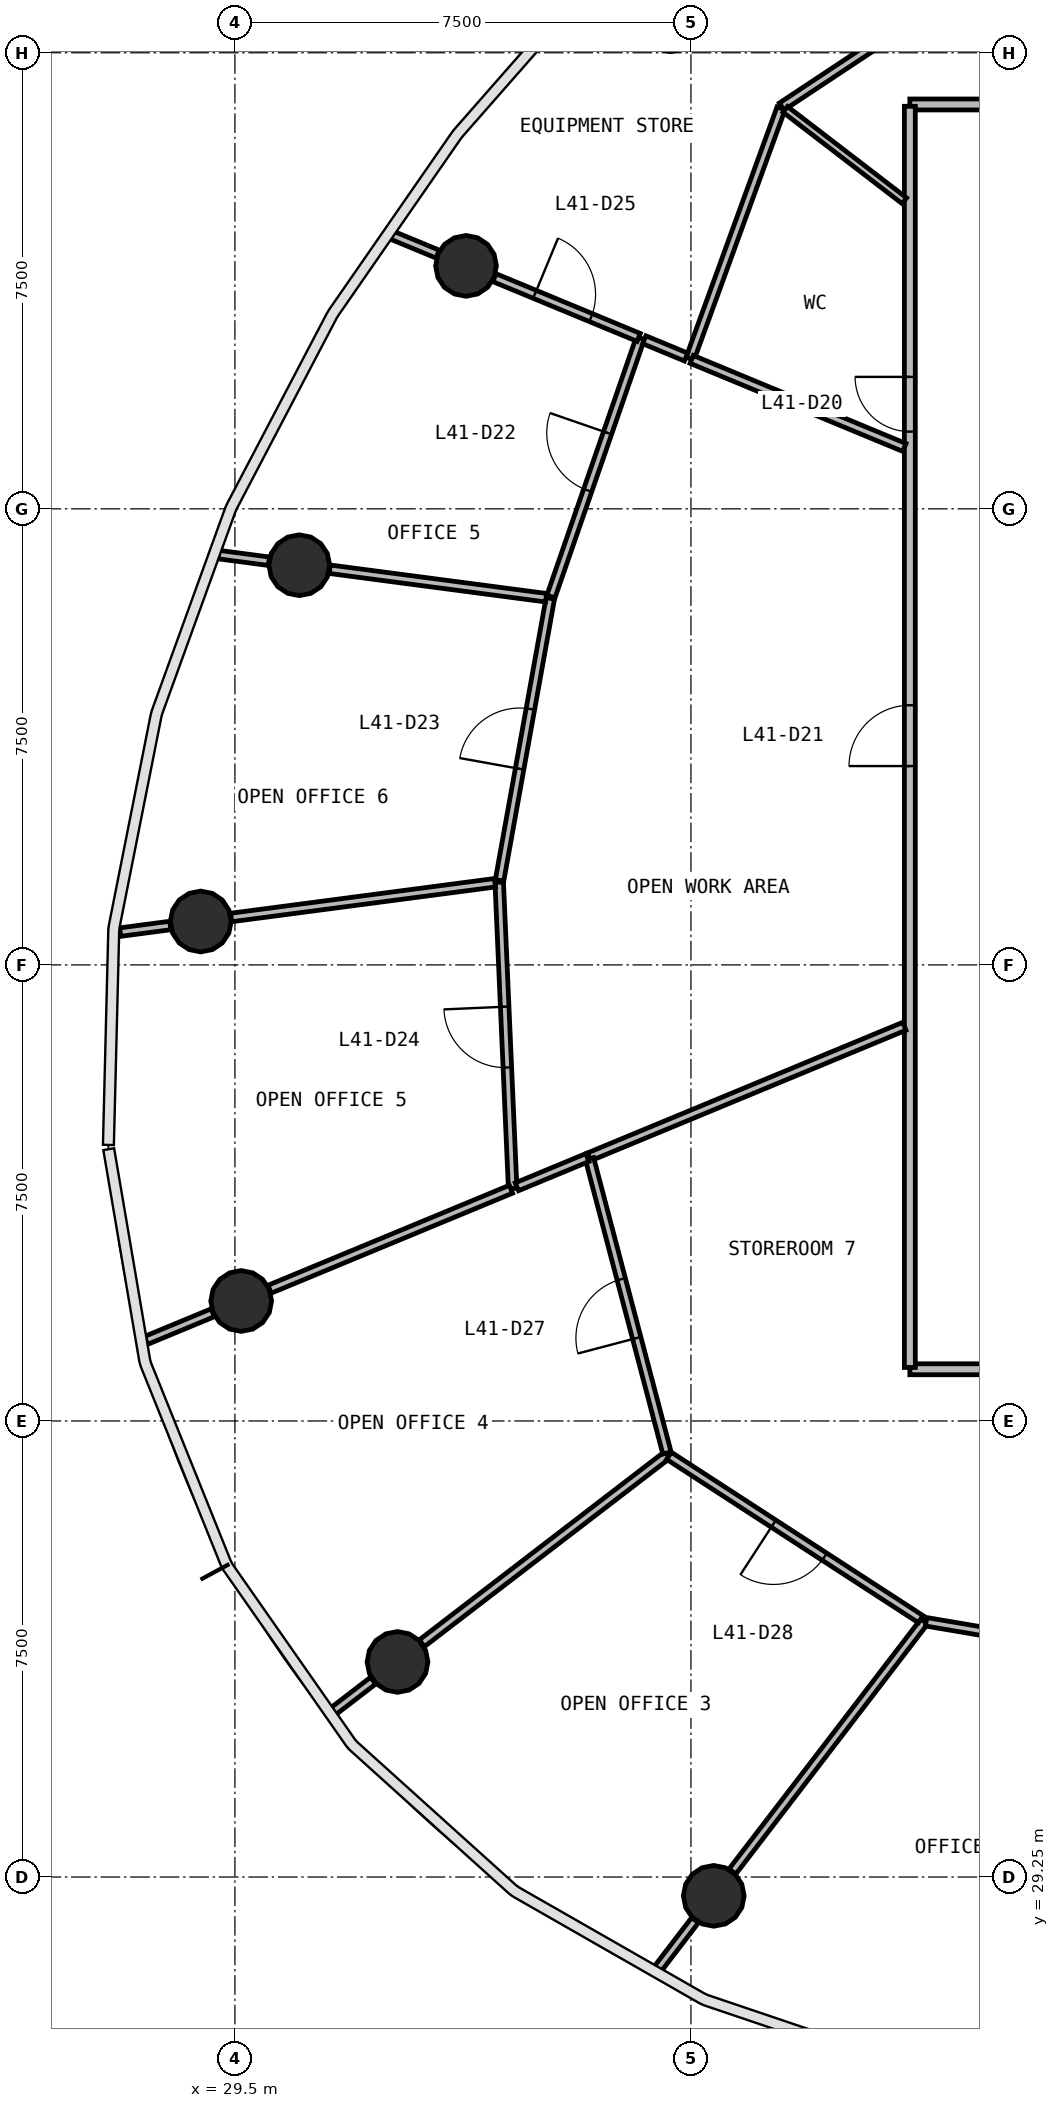
"""IFC4 building model, lengths in metres.
Left out: names, types, materials, properties, quantities, classifications, styles, units other than length and angle.
Written with IfcOpenShell. Run it as: python <this file> out.ifc"""

import sys

from ifc_helpers import new_model, si_unit, direction, frame, frame_2d, origin, origin_2d, place, context, subcontext, project, spatial, rectangle, circle, extrude, source, transform, mapped, element, fill, save


model = new_model("IFC4")
c1 = context("Model", 3, precision=1e-05, world=origin(), true_north=direction((0.0, 1.0)))
c2 = subcontext(c1, "Body", "Model", "MODEL_VIEW")
j1 = project(units=[si_unit("LENGTHUNIT", "METRE"), si_unit("PLANEANGLEUNIT", "RADIAN")], contexts=[c1])
p1 = place(None, origin())
s1 = spatial("IfcSite", under=j1, at=p1, CompositionType="ELEMENT")
p2 = place(p1, origin())
s2 = spatial("IfcBuilding", under=s1, at=p2, CompositionType="ELEMENT")
p3 = place(p2, frame((0.0, 0.0, 172.1)))
s3 = spatial("IfcBuildingStorey", under=s2, at=p3, CompositionType="ELEMENT", Elevation=172.1)
m1 = source(origin(), c2, "Body", "SweptSolid", [
    extrude(circle(Radius=0.5, at=origin_2d()), origin(), (0.0, 0.0, 1.0), 3.9),
])
for number, where, z_axis, x_axis in (
    (1, (33.301, 55.746, 0.0), (0.0, 0.0, 1.0), (1.0, 0.0, 0.0)),
    (2, (30.559, 50.823, 0.0), (0.0, 0.0, 1.0), (1.0, 0.0, 0.0)),
    (3, (28.938, 44.964, 0.0), (0.0, 0.0, 1.0), (1.0, 0.0, 0.0)),
    (4, (29.603, 38.723, 0.0), (0.0, 0.0, 1.0), (1.0, 0.0, 0.0)),
    (5, (32.174, 32.787, 0.0), (0.0, 0.0, 1.0), (1.0, 0.0, 0.0)),
    (6, (37.375, 28.94, 0.0), (0.0, 0.0, 1.0), (1.0, 0.0, 0.0)),
):
    element("IfcColumn", number, at=place(p3, frame(where, z_axis=z_axis, x_axis=x_axis)), inside=s3, PredefinedType="COLUMN", context=c2, shape_type="MappedRepresentation", body=[
        mapped(m1, transform((0.0, 0.0, 0.0), scale=1.0)),
    ])
p4 = place(p3, frame((40.6, 58.4, 0.0), z_axis=(0.0, 0.0, 1.0), x_axis=(1.0, 0.0, 0.0)))
e7 = element("IfcWall", 7, at=p4, inside=s3, PredefinedType="PARTITIONING", context=c2, shape_type="SweptSolid", body=[
    extrude(rectangle(XDim=22.8, YDim=0.18, at=frame_2d((11.4, 0.0))), origin(), (0.0, 0.0, 1.0), 2.88),
])
p5 = place(p4, frame((2.05, 0.0, 0.0)))
e8 = element("IfcOpeningElement", 8, at=p5, cuts=e7, PredefinedType="OPENING", context=c2, shape_type="SweptSolid", body=[
    extrude(rectangle(XDim=0.9, YDim=2.1, at=frame_2d((0.45, 1.05))), frame((0.0, 0.1, 0.0), z_axis=(0.0, -1.0, 0.0), x_axis=(1.0, 0.0, 0.0)), (0.0, 0.0, 1.0), 0.2),
])
p6 = place(p4, frame((16.15, 0.0, 0.0)))
e9 = element("IfcOpeningElement", 9, at=p6, cuts=e7, PredefinedType="OPENING", context=c2, shape_type="SweptSolid", body=[
    extrude(rectangle(XDim=1.0, YDim=2.1, at=frame_2d((0.5, 1.05))), frame((0.0, 0.1, 0.0), z_axis=(0.0, -1.0, 0.0), x_axis=(1.0, 0.0, 0.0)), (0.0, 0.0, 1.0), 0.2),
])
p7 = place(p4, frame((10.95, 0.0, 0.0)))
e10 = element("IfcOpeningElement", 10, at=p7, cuts=e7, PredefinedType="OPENING", context=c2, shape_type="SweptSolid", body=[
    extrude(rectangle(XDim=1.0, YDim=2.1, at=frame_2d((0.5, 1.05))), frame((0.0, 0.1, 0.0), z_axis=(0.0, -1.0, 0.0), x_axis=(1.0, 0.0, 0.0)), (0.0, 0.0, 1.0), 0.2),
])
p8 = place(p4, frame((8.75, 0.0, 0.0)))
e11 = element("IfcOpeningElement", 11, at=p8, cuts=e7, PredefinedType="OPENING", context=c2, shape_type="SweptSolid", body=[
    extrude(rectangle(XDim=1.0, YDim=2.1, at=frame_2d((0.5, 1.05))), frame((0.0, 0.1, 0.0), z_axis=(0.0, -1.0, 0.0), x_axis=(1.0, 0.0, 0.0)), (0.0, 0.0, 1.0), 0.2),
])
p9 = place(p3, frame((63.4, 37.6, 0.0), z_axis=(0.0, 0.0, 1.0), x_axis=(-1.0, 0.0, 0.0)))
e12 = element("IfcWall", 12, at=p9, inside=s3, PredefinedType="PARTITIONING", context=c2, shape_type="SweptSolid", body=[
    extrude(rectangle(XDim=22.8, YDim=0.18, at=frame_2d((11.4, 0.0))), origin(), (0.0, 0.0, 1.0), 2.88),
])
p10 = place(p9, frame((16.15, 0.0, 0.0)))
e13 = element("IfcOpeningElement", 13, at=p10, cuts=e12, PredefinedType="OPENING", context=c2, shape_type="SweptSolid", body=[
    extrude(rectangle(XDim=1.0, YDim=2.1, at=frame_2d((0.5, 1.05))), frame((0.0, 0.1, 0.0), z_axis=(0.0, -1.0, 0.0), x_axis=(1.0, 0.0, 0.0)), (0.0, 0.0, 1.0), 0.2),
])
p11 = place(p9, frame((10.95, 0.0, 0.0)))
e14 = element("IfcOpeningElement", 14, at=p11, cuts=e12, PredefinedType="OPENING", context=c2, shape_type="SweptSolid", body=[
    extrude(rectangle(XDim=1.0, YDim=2.1, at=frame_2d((0.5, 1.05))), frame((0.0, 0.1, 0.0), z_axis=(0.0, -1.0, 0.0), x_axis=(1.0, 0.0, 0.0)), (0.0, 0.0, 1.0), 0.2),
])
p12 = place(p9, frame((8.75, 0.0, 0.0)))
e15 = element("IfcOpeningElement", 15, at=p12, cuts=e12, PredefinedType="OPENING", context=c2, shape_type="SweptSolid", body=[
    extrude(rectangle(XDim=1.0, YDim=2.1, at=frame_2d((0.5, 1.05))), frame((0.0, 0.1, 0.0), z_axis=(0.0, -1.0, 0.0), x_axis=(1.0, 0.0, 0.0)), (0.0, 0.0, 1.0), 0.2),
])
p13 = place(p3, frame((40.6, 37.63, 0.0), z_axis=(0.0, 0.0, 1.0), x_axis=(0.0, 1.0, 0.0)))
e16 = element("IfcWall", 16, at=p13, inside=s3, PredefinedType="PARTITIONING", context=c2, shape_type="SweptSolid", body=[
    extrude(rectangle(XDim=20.74, YDim=0.18, at=frame_2d((10.37, 0.0))), origin(), (0.0, 0.0, 1.0), 2.88),
])
p14 = place(p13, frame((15.39, 0.0, 0.0)))
e17 = element("IfcOpeningElement", 17, at=p14, cuts=e16, PredefinedType="OPENING", context=c2, shape_type="SweptSolid", body=[
    extrude(rectangle(XDim=0.9, YDim=2.1, at=frame_2d((0.45, 1.05))), frame((0.0, 0.1, 0.0), z_axis=(0.0, -1.0, 0.0), x_axis=(1.0, 0.0, 0.0)), (0.0, 0.0, 1.0), 0.2),
])
p15 = place(p13, frame((9.89, 0.0, 0.0)))
e18 = element("IfcOpeningElement", 18, at=p15, cuts=e16, PredefinedType="OPENING", context=c2, shape_type="SweptSolid", body=[
    extrude(rectangle(XDim=1.0, YDim=2.1, at=frame_2d((0.5, 1.05))), frame((0.0, 0.1, 0.0), z_axis=(0.0, -1.0, 0.0), x_axis=(1.0, 0.0, 0.0)), (0.0, 0.0, 1.0), 0.2),
])
p16 = place(p3, frame((40.51, 43.241, 0.0), z_axis=(0.0, 0.0, 1.0), x_axis=(-0.923868925848, -0.382709038112, 0.0)))
e19 = element("IfcWall", 19, at=p16, inside=s3, PredefinedType="PARTITIONING", context=c2, shape_type="SweptSolid", body=[
    extrude(rectangle(XDim=5.613, YDim=0.14, at=frame_2d((2.807, 0.0))), origin(), (0.0, 0.0, 1.0), 2.88),
])
p17 = place(p3, frame((40.837, 33.453, 0.0), z_axis=(0.0, 0.0, 1.0), x_axis=(-0.608781556018, -0.793337895888, 0.0)))
e20 = element("IfcWall", 20, at=p17, inside=s3, PredefinedType="PARTITIONING", context=c2, shape_type="SweptSolid", body=[
    extrude(rectangle(XDim=5.183, YDim=0.14, at=frame_2d((2.591, 0.0))), origin(), (0.0, 0.0, 1.0), 2.88),
])
p18 = place(p3, frame((36.614, 36.194, 0.0), z_axis=(0.0, 0.0, 1.0), x_axis=(-0.793380951851, -0.608725443234, 0.0)))
e21 = element("IfcWall", 21, at=p18, inside=s3, PredefinedType="PARTITIONING", context=c2, shape_type="SweptSolid", body=[
    extrude(rectangle(XDim=5.092, YDim=0.14, at=frame_2d((2.546, 0.0))), origin(), (0.0, 0.0, 1.0), 2.88),
])
p19 = place(p3, frame((36.606, 36.223, 0.0), z_axis=(0.0, 0.0, 1.0), x_axis=(-0.254531708775, 0.967064428685, 0.0)))
e22 = element("IfcWall", 22, at=p19, inside=s3, PredefinedType="PARTITIONING", context=c2, shape_type="SweptSolid", body=[
    extrude(rectangle(XDim=5.006, YDim=0.14, at=frame_2d((2.503, 0.0))), origin(), (0.0, 0.0, 1.0), 2.88),
])
p20 = place(p19, frame((1.956, 0.0, 0.0)))
e23 = element("IfcOpeningElement", 23, at=p20, cuts=e22, PredefinedType="OPENING", context=c2, shape_type="SweptSolid", body=[
    extrude(rectangle(XDim=1.0, YDim=2.1, at=frame_2d((0.5, 1.05))), frame((0.0, 0.08, 0.0), z_axis=(0.0, -1.0, 0.0), x_axis=(1.0, 0.0, 0.0)), (0.0, 0.0, 1.0), 0.16),
])
p21 = place(p3, frame((34.068, 40.572, 0.0), z_axis=(0.0, 0.0, 1.0), x_axis=(-0.043863726501, 0.999037523568, 0.0)))
e24 = element("IfcWall", 24, at=p21, inside=s3, PredefinedType="PARTITIONING", context=c2, shape_type="SweptSolid", body=[
    extrude(rectangle(XDim=5.043, YDim=0.14, at=frame_2d((2.521, 0.0))), origin(), (0.0, 0.0, 1.0), 2.88),
])
p22 = place(p21, frame((1.993, 0.0, 0.0)))
e25 = element("IfcOpeningElement", 25, at=p22, cuts=e24, PredefinedType="OPENING", context=c2, shape_type="SweptSolid", body=[
    extrude(rectangle(XDim=1.0, YDim=2.1, at=frame_2d((0.5, 1.05))), frame((0.0, 0.08, 0.0), z_axis=(0.0, -1.0, 0.0), x_axis=(1.0, 0.0, 0.0)), (0.0, 0.0, 1.0), 0.16),
])
p23 = place(p3, frame((40.779, 33.491, 0.0), z_axis=(0.0, 0.0, 1.0), x_axis=(-0.83885932545, 0.544348263619, 0.0)))
e26 = element("IfcWall", 26, at=p23, inside=s3, PredefinedType="PARTITIONING", context=c2, shape_type="SweptSolid", body=[
    extrude(rectangle(XDim=4.935, YDim=0.14, at=frame_2d((2.467, 0.0))), origin(), (0.0, 0.0, 1.0), 2.88),
])
p24 = place(p23, frame((1.885, 0.0, 0.0)))
e27 = element("IfcOpeningElement", 27, at=p24, cuts=e26, PredefinedType="OPENING", context=c2, shape_type="SweptSolid", body=[
    extrude(rectangle(XDim=1.0, YDim=2.1, at=frame_2d((0.5, 1.05))), frame((0.0, 0.08, 0.0), z_axis=(0.0, -1.0, 0.0), x_axis=(1.0, 0.0, 0.0)), (0.0, 0.0, 1.0), 0.16),
])
p25 = place(p3, frame((45.607, 32.643, 0.0), z_axis=(0.0, 0.0, 1.0), x_axis=(-0.985896840753, 0.167354173514, 0.0)))
e28 = element("IfcWall", 28, at=p25, inside=s3, PredefinedType="PARTITIONING", context=c2, shape_type="SweptSolid", body=[
    extrude(rectangle(XDim=4.808, YDim=0.14, at=frame_2d((2.404, 0.0))), origin(), (0.0, 0.0, 1.0), 2.88),
])
p26 = place(p25, frame((1.958, 0.0, 0.0)))
e29 = element("IfcOpeningElement", 29, at=p26, cuts=e28, PredefinedType="OPENING", context=c2, shape_type="SweptSolid", body=[
    extrude(rectangle(XDim=1.0, YDim=2.1, at=frame_2d((0.5, 1.05))), frame((0.0, 0.08, 0.0), z_axis=(0.0, -1.0, 0.0), x_axis=(1.0, 0.0, 0.0)), (0.0, 0.0, 1.0), 0.16),
])
p27 = place(p3, frame((33.852, 45.64, 0.0), z_axis=(0.0, 0.0, 1.0), x_axis=(0.177167043884, 0.984180795668, 0.0)))
e30 = element("IfcWall", 30, at=p27, inside=s3, PredefinedType="PARTITIONING", context=c2, shape_type="SweptSolid", body=[
    extrude(rectangle(XDim=4.714, YDim=0.14, at=frame_2d((2.357, 0.0))), origin(), (0.0, 0.0, 1.0), 2.88),
])
p28 = place(p27, frame((1.864, 0.0, 0.0)))
e31 = element("IfcOpeningElement", 31, at=p28, cuts=e30, PredefinedType="OPENING", context=c2, shape_type="SweptSolid", body=[
    extrude(rectangle(XDim=1.0, YDim=2.1, at=frame_2d((0.5, 1.05))), frame((0.0, 0.08, 0.0), z_axis=(0.0, -1.0, 0.0), x_axis=(1.0, 0.0, 0.0)), (0.0, 0.0, 1.0), 0.16),
])
p29 = place(p3, frame((34.697, 50.308, 0.0), z_axis=(0.0, 0.0, 1.0), x_axis=(0.327118021709, 0.944983491852, 0.0)))
e32 = element("IfcWall", 32, at=p29, inside=s3, PredefinedType="PARTITIONING", context=c2, shape_type="SweptSolid", body=[
    extrude(rectangle(XDim=4.497, YDim=0.14, at=frame_2d((2.249, 0.0))), origin(), (0.0, 0.0, 1.0), 2.88),
])
p30 = place(p29, frame((1.847, 0.0, 0.0)))
e33 = element("IfcOpeningElement", 33, at=p30, cuts=e32, PredefinedType="OPENING", context=c2, shape_type="SweptSolid", body=[
    extrude(rectangle(XDim=1.0, YDim=2.1, at=frame_2d((0.5, 1.05))), frame((0.0, 0.08, 0.0), z_axis=(0.0, -1.0, 0.0), x_axis=(1.0, 0.0, 0.0)), (0.0, 0.0, 1.0), 0.16),
])
p31 = place(p3, frame((33.777, 45.601, 0.0), z_axis=(0.0, 0.0, 1.0), x_axis=(-0.991451067431, -0.130479043871, 0.0)))
e34 = element("IfcWall", 34, at=p31, inside=s3, PredefinedType="PARTITIONING", context=c2, shape_type="SweptSolid", body=[
    extrude(rectangle(XDim=4.376, YDim=0.14, at=frame_2d((2.188, 0.0))), origin(), (0.0, 0.0, 1.0), 2.88),
])
p32 = place(p3, frame((42.175, 60.804, 0.0), z_axis=(0.0, 0.0, 1.0), x_axis=(-0.833696109899, -0.552223502162, 0.0)))
e35 = element("IfcWall", 35, at=p32, inside=s3, PredefinedType="PARTITIONING", context=c2, shape_type="SweptSolid", body=[
    extrude(rectangle(XDim=4.417, YDim=0.14, at=frame_2d((2.209, 0.0))), origin(), (0.0, 0.0, 1.0), 2.88),
])
p33 = place(p3, frame((38.482, 58.337, 0.0), z_axis=(0.0, 0.0, 1.0), x_axis=(-0.341774383975, -0.939782033484, 0.0)))
e36 = element("IfcWall", 36, at=p33, inside=s3, PredefinedType="PARTITIONING", context=c2, shape_type="SweptSolid", body=[
    extrude(rectangle(XDim=4.381, YDim=0.14, at=frame_2d((2.19, 0.0))), origin(), (0.0, 0.0, 1.0), 2.88),
])
p34 = place(p3, frame((34.04, 40.561, 0.0), z_axis=(0.0, 0.0, 1.0), x_axis=(-0.923886665857, -0.382666210491, 0.0)))
e37 = element("IfcWall", 37, at=p34, inside=s3, PredefinedType="PARTITIONING", context=c2, shape_type="SweptSolid", body=[
    extrude(rectangle(XDim=4.298, YDim=0.14, at=frame_2d((2.149, 0.0))), origin(), (0.0, 0.0, 1.0), 2.88),
])
p35 = place(p3, frame((40.51, 52.759, 0.0), z_axis=(0.0, 0.0, 1.0), x_axis=(-0.923870623115, 0.382704940842, 0.0)))
e38 = element("IfcWall", 38, at=p35, inside=s3, PredefinedType="PARTITIONING", context=c2, shape_type="SweptSolid", body=[
    extrude(rectangle(XDim=3.785, YDim=0.14, at=frame_2d((1.893, 0.0))), origin(), (0.0, 0.0, 1.0), 2.88),
])
p36 = place(p3, frame((34.618, 50.288, 0.0), z_axis=(0.0, 0.0, 1.0), x_axis=(-0.991445727945, 0.130519609791, 0.0)))
e39 = element("IfcWall", 39, at=p36, inside=s3, PredefinedType="PARTITIONING", context=c2, shape_type="SweptSolid", body=[
    extrude(rectangle(XDim=3.59, YDim=0.14, at=frame_2d((1.795, 0.0))), origin(), (0.0, 0.0, 1.0), 2.88),
])
p37 = place(p3, frame((33.767, 55.552, 0.0), z_axis=(0.0, 0.0, 1.0), x_axis=(0.923865084747, -0.38271831049, 0.0)))
e40 = element("IfcWall", 40, at=p37, inside=s3, PredefinedType="PARTITIONING", context=c2, shape_type="SweptSolid", body=[
    extrude(rectangle(XDim=2.569, YDim=0.14, at=frame_2d((1.284, 0.0))), origin(), (0.0, 0.0, 1.0), 2.88),
])
p38 = place(p37, frame((0.719, 0.0, 0.0)))
e41 = element("IfcOpeningElement", 41, at=p38, cuts=e40, PredefinedType="OPENING", context=c2, shape_type="SweptSolid", body=[
    extrude(rectangle(XDim=1.0, YDim=2.1, at=frame_2d((0.5, 1.05))), frame((0.0, 0.08, 0.0), z_axis=(0.0, -1.0, 0.0), x_axis=(1.0, 0.0, 0.0)), (0.0, 0.0, 1.0), 0.16),
])
p39 = place(p3, frame((35.296, 41.081, 0.0), z_axis=(0.0, 0.0, 1.0), x_axis=(-0.923914904854, -0.38259802481, 0.0)))
e42 = element("IfcWall", 42, at=p39, inside=s3, PredefinedType="PARTITIONING", context=c2, shape_type="SweptSolid", body=[
    extrude(rectangle(XDim=1.255, YDim=0.14, at=frame_2d((0.627, 0.0))), origin(), (0.0, 0.0, 1.0), 2.88),
])
p40 = place(p3, frame((29.137, 38.53, 0.0), z_axis=(0.0, 0.0, 1.0), x_axis=(-0.923876703835, -0.382690261322, 0.0)))
e43 = element("IfcWall", 43, at=p40, inside=s3, PredefinedType="PARTITIONING", context=c2, shape_type="SweptSolid", body=[
    extrude(rectangle(XDim=1.189, YDim=0.14, at=frame_2d((0.595, 0.0))), origin(), (0.0, 0.0, 1.0), 2.88),
])
p41 = place(p3, frame((37.068, 28.54, 0.0), z_axis=(0.0, 0.0, 1.0), x_axis=(-0.608710939512, -0.793392079692, 0.0)))
e44 = element("IfcWall", 44, at=p41, inside=s3, PredefinedType="PARTITIONING", context=c2, shape_type="SweptSolid", body=[
    extrude(rectangle(XDim=1.027, YDim=0.14, at=frame_2d((0.514, 0.0))), origin(), (0.0, 0.0, 1.0), 2.88),
])
p42 = place(p3, frame((36.92, 54.246, 0.0), z_axis=(0.0, 0.0, 1.0), x_axis=(-0.923832744819, 0.382796368322, 0.0)))
e45 = element("IfcWall", 45, at=p42, inside=s3, PredefinedType="PARTITIONING", context=c2, shape_type="SweptSolid", body=[
    extrude(rectangle(XDim=0.744, YDim=0.14, at=frame_2d((0.372, 0.0))), origin(), (0.0, 0.0, 1.0), 2.88),
])
p43 = place(p3, frame((31.774, 32.48, 0.0), z_axis=(0.0, 0.0, 1.0), x_axis=(-0.793240633291, -0.608908283484, 0.0)))
e46 = element("IfcWall", 46, at=p43, inside=s3, PredefinedType="PARTITIONING", context=c2, shape_type="SweptSolid", body=[
    extrude(rectangle(XDim=0.838, YDim=0.14, at=frame_2d((0.419, 0.0))), origin(), (0.0, 0.0, 1.0), 2.88),
])
p44 = place(p3, frame((30.059, 50.889, 0.0), z_axis=(0.0, 0.0, 1.0), x_axis=(-0.991453302112, 0.130462062421, 0.0)))
e47 = element("IfcWall", 47, at=p44, inside=s3, PredefinedType="PARTITIONING", context=c2, shape_type="SweptSolid", body=[
    extrude(rectangle(XDim=0.836, YDim=0.14, at=frame_2d((0.418, 0.0))), origin(), (0.0, 0.0, 1.0), 2.88),
])
p45 = place(p3, frame((28.438, 44.898, 0.0), z_axis=(0.0, 0.0, 1.0), x_axis=(-0.991444308748, -0.130530389761, 0.0)))
e48 = element("IfcWall", 48, at=p45, inside=s3, PredefinedType="PARTITIONING", context=c2, shape_type="SweptSolid", body=[
    extrude(rectangle(XDim=0.832, YDim=0.14, at=frame_2d((0.416, 0.0))), origin(), (0.0, 0.0, 1.0), 2.88),
])
p46 = place(p3, frame((32.834, 55.939, 0.0), z_axis=(0.0, 0.0, 1.0), x_axis=(-0.923798714545, 0.382878485951, 0.0)))
e49 = element("IfcWall", 49, at=p46, inside=s3, PredefinedType="PARTITIONING", context=c2, shape_type="SweptSolid", body=[
    extrude(rectangle(XDim=0.819, YDim=0.14, at=frame_2d((0.409, 0.0))), origin(), (0.0, 0.0, 1.0), 2.88),
])
p47 = place(p3, frame((40.51, 56.817, 0.0), z_axis=(0.0, 0.0, 1.0), x_axis=(-0.79340260872, 0.608697215762, 0.0)))
e50 = element("IfcWall", 50, at=p47, inside=s3, PredefinedType="PARTITIONING", context=c2, shape_type="SweptSolid", body=[
    extrude(rectangle(XDim=2.469, YDim=0.12, at=frame_2d((1.234, 0.0))), origin(), (0.0, 0.0, 1.0), 2.88),
])
m2 = source(origin(), c2, "Body", "SweptSolid", [
    extrude(rectangle(XDim=0.9, YDim=2.1, at=frame_2d((0.45, 1.05))), frame((0.0, 0.025, 0.0), z_axis=(0.0, -1.0, 0.0), x_axis=(1.0, 0.0, 0.0)), (0.0, 0.0, 1.0), 0.05),
])
p48 = place(p14, origin())
e51 = element("IfcDoor", 51, at=p48, inside=s3, OperationType="SINGLE_SWING_RIGHT", PredefinedType="DOOR", context=c2, shape_type="MappedRepresentation", body=[
    mapped(m2, transform((0.0, 0.0, 0.0), scale=1.0)),
])
fill(e17, e51)
m3 = source(origin(), c2, "Body", "SweptSolid", [
    extrude(rectangle(XDim=1.0, YDim=2.1, at=frame_2d((0.5, 1.05))), frame((0.0, 0.025, 0.0), z_axis=(0.0, -1.0, 0.0), x_axis=(1.0, 0.0, 0.0)), (0.0, 0.0, 1.0), 0.05),
])
p49 = place(p15, origin())
e52 = element("IfcDoor", 52, at=p49, inside=s3, OperationType="SINGLE_SWING_LEFT", PredefinedType="DOOR", context=c2, shape_type="MappedRepresentation", body=[
    mapped(m3, transform((0.0, 0.0, 0.0), scale=1.0)),
])
fill(e18, e52)
p50 = place(p30, origin())
e53 = element("IfcDoor", 53, at=p50, inside=s3, OperationType="SINGLE_SWING_RIGHT", PredefinedType="DOOR", context=c2, shape_type="MappedRepresentation", body=[
    mapped(m3, transform((0.0, 0.0, 0.0), scale=1.0)),
])
fill(e33, e53)
p51 = place(p28, origin())
e54 = element("IfcDoor", 54, at=p51, inside=s3, OperationType="SINGLE_SWING_LEFT", PredefinedType="DOOR", context=c2, shape_type="MappedRepresentation", body=[
    mapped(m3, transform((0.0, 0.0, 0.0), scale=1.0)),
])
fill(e31, e54)
p52 = place(p22, origin())
e55 = element("IfcDoor", 55, at=p52, inside=s3, OperationType="SINGLE_SWING_RIGHT", PredefinedType="DOOR", context=c2, shape_type="MappedRepresentation", body=[
    mapped(m3, transform((0.0, 0.0, 0.0), scale=1.0)),
])
fill(e25, e55)
p53 = place(p38, origin())
e56 = element("IfcDoor", 56, at=p53, inside=s3, OperationType="SINGLE_SWING_LEFT", PredefinedType="DOOR", context=c2, shape_type="MappedRepresentation", body=[
    mapped(m3, transform((0.0, 0.0, 0.0), scale=1.0)),
])
fill(e41, e56)
p54 = place(p20, origin())
e57 = element("IfcDoor", 57, at=p54, inside=s3, OperationType="SINGLE_SWING_LEFT", PredefinedType="DOOR", context=c2, shape_type="MappedRepresentation", body=[
    mapped(m3, transform((0.0, 0.0, 0.0), scale=1.0)),
])
fill(e23, e57)
p55 = place(p24, origin())
e58 = element("IfcDoor", 58, at=p55, inside=s3, OperationType="SINGLE_SWING_RIGHT", PredefinedType="DOOR", context=c2, shape_type="MappedRepresentation", body=[
    mapped(m3, transform((0.0, 0.0, 0.0), scale=1.0)),
])
fill(e27, e58)
save(model, sys.argv[1])
